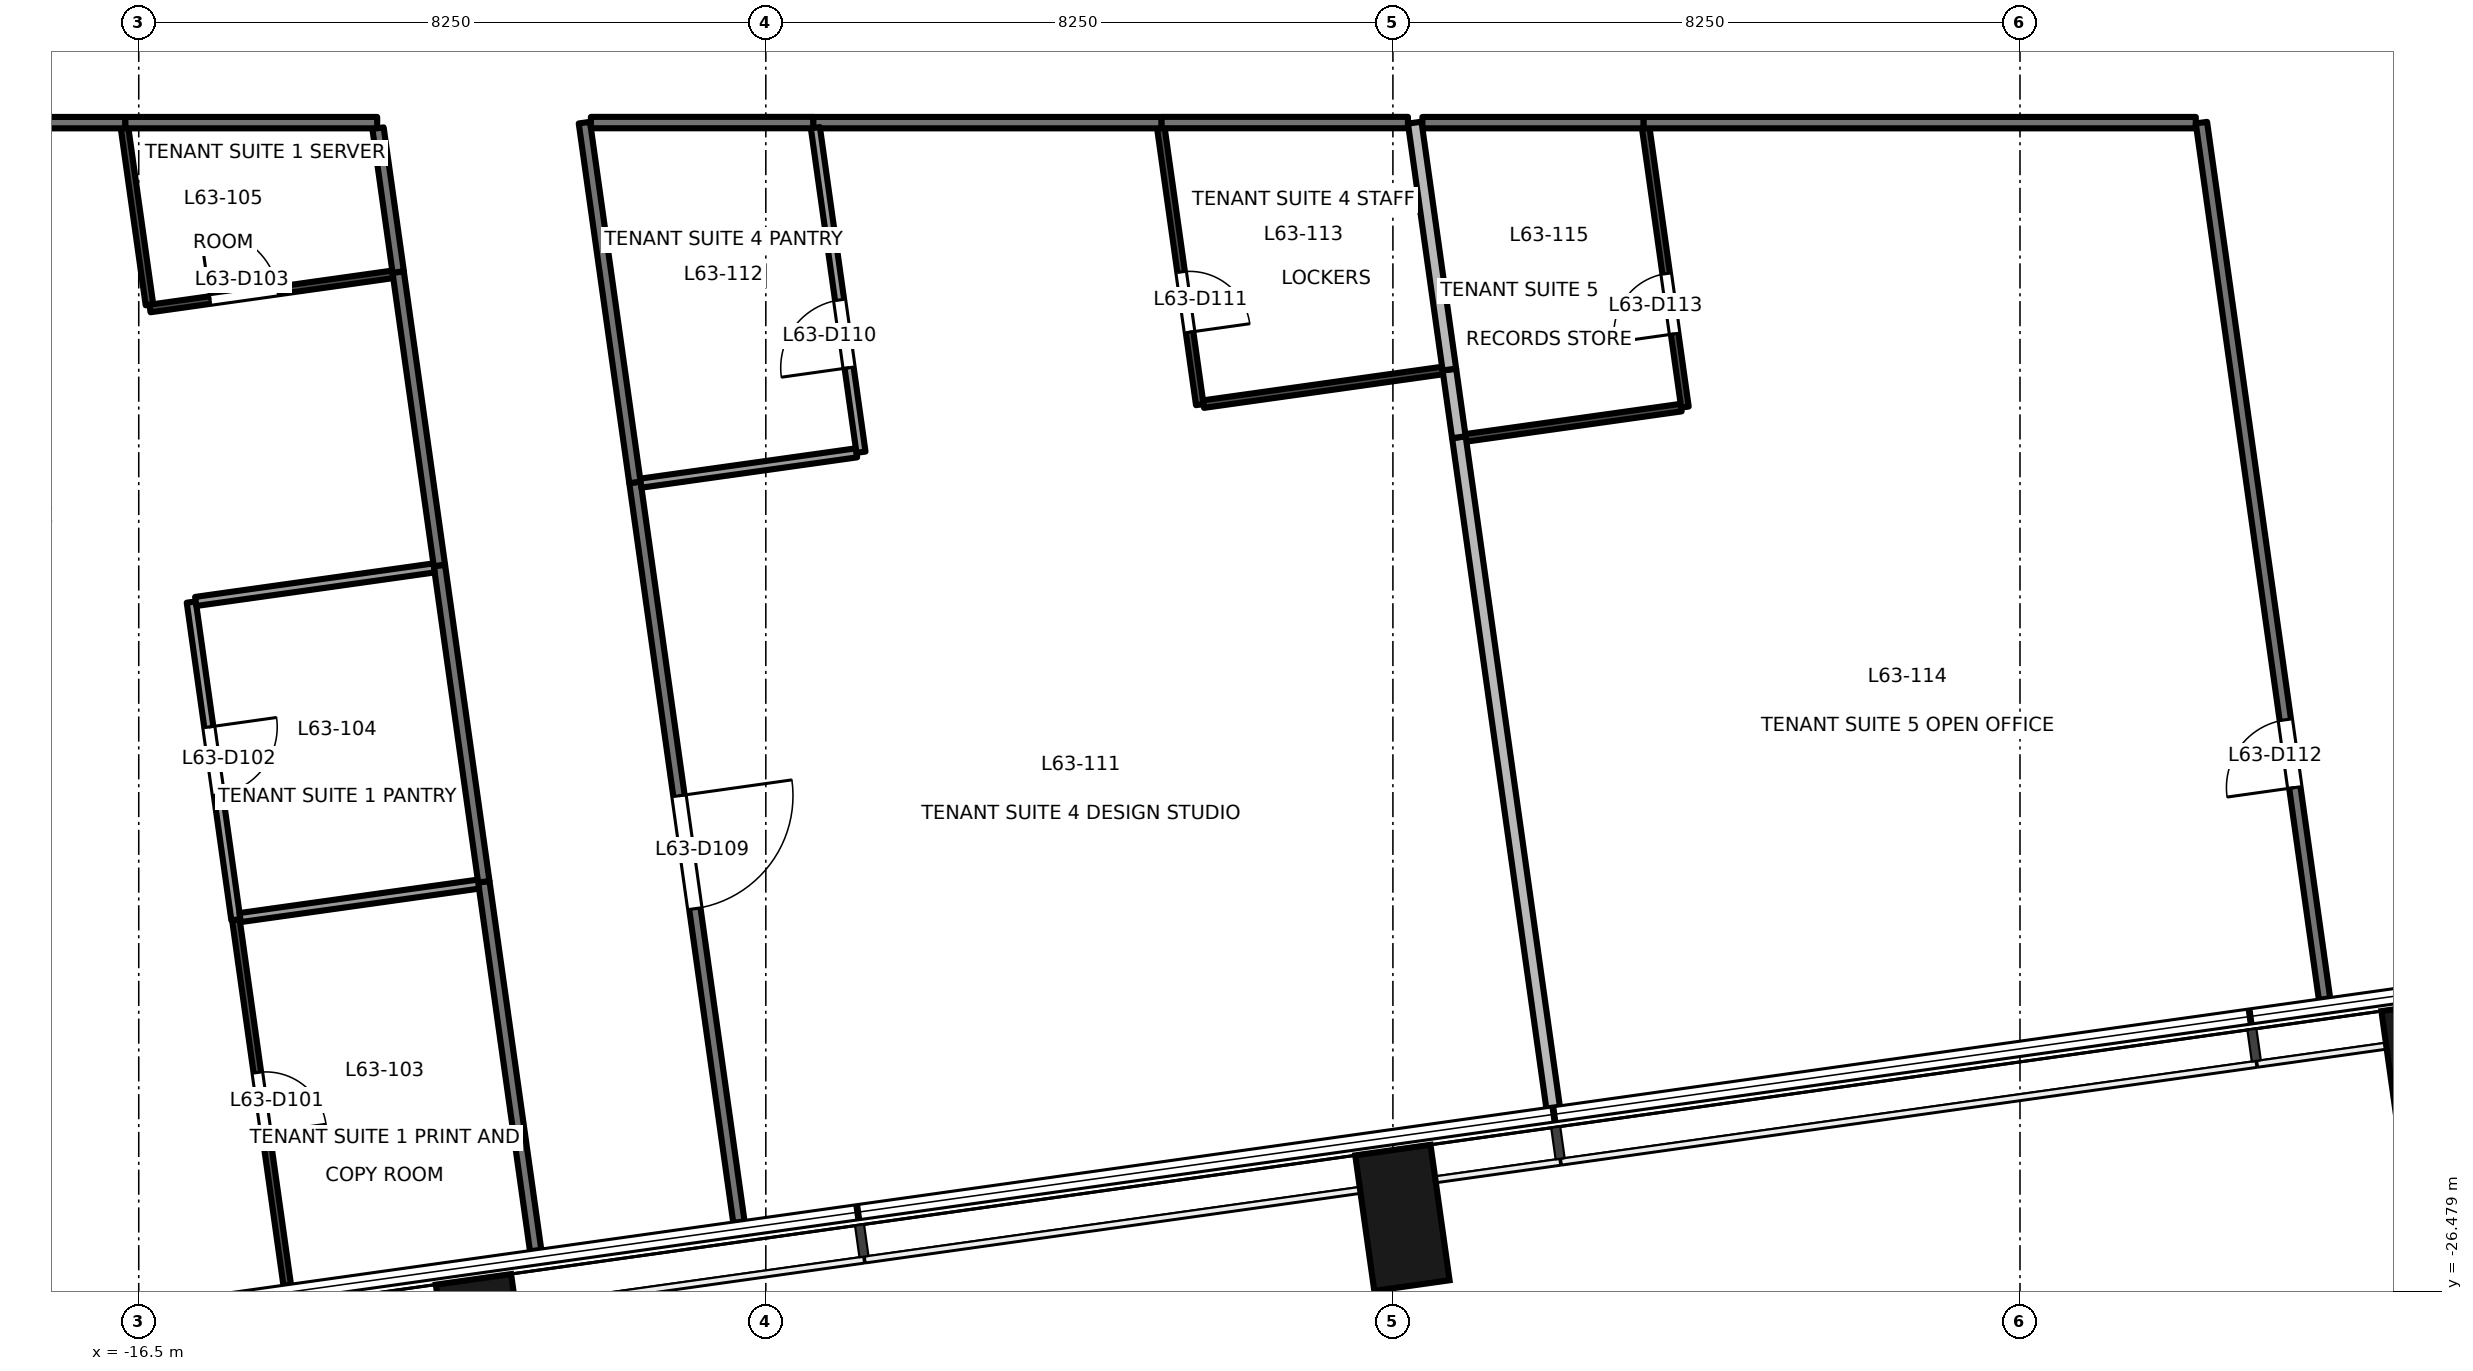
"""IFC4 building model, lengths in metres.
Left out: names, types, materials, properties, quantities, classifications, styles, units other than length and angle.
Written with IfcOpenShell. Run it as: python <this file> out.ifc"""

import sys

from ifc_helpers import new_model, si_unit, direction, frame, frame_2d, origin, origin_2d, place, context, subcontext, project, spatial, rectangle, extrude, element, fill, save


model = new_model("IFC4")
c1 = context("Model", 3, precision=1e-05, world=origin(), true_north=direction((0.0, 1.0)))
c2 = subcontext(c1, "Body", "Model", "MODEL_VIEW")
j1 = project(units=[si_unit("LENGTHUNIT", "METRE"), si_unit("PLANEANGLEUNIT", "RADIAN")], contexts=[c1])
p1 = place(None, origin())
s1 = spatial("IfcSite", under=j1, at=p1, CompositionType="ELEMENT")
p2 = place(p1, origin())
s2 = spatial("IfcBuilding", under=s1, at=p2, CompositionType="ELEMENT")
p3 = place(p2, frame((0.0, 0.0, 274.6)))
s3 = spatial("IfcBuildingStorey", under=s2, at=p3, CompositionType="ELEMENT", Elevation=274.6)
for number, where, z_axis, x_axis in (
    (1, (-11.971, -27.209, -0.2), (0.0, 0.0, 1.0), (0.99, 0.139, 0.0)),
    (2, (0.125, -25.508, -0.2), (0.0, 0.0, 1.0), (0.99, 0.139, 0.0)),
    (3, (13.625, -23.61, -0.2), (0.0, 0.0, 1.0), (0.99, 0.139, 0.0)),
):
    element("IfcColumn", number, at=place(p3, frame(where, z_axis=z_axis, x_axis=x_axis)), inside=s3, PredefinedType="COLUMN", context=c2, shape_type="SweptSolid", body=[
        extrude(rectangle(XDim=1.0, YDim=1.8, at=origin_2d()), origin(), (0.0, 0.0, 1.0), 3.9),
    ])
p4 = place(p3, frame((-16.676, -11.1, 0.0), z_axis=(0.0, 0.0, 1.0), x_axis=(-1.0, 0.0, 0.0)))
e4 = element("IfcWall", 4, at=p4, inside=s3, PredefinedType="PARTITIONING", context=c2, shape_type="SweptSolid", body=[
    extrude(rectangle(XDim=4.024, YDim=0.15, at=frame_2d((2.012, 0.0))), origin(), (0.0, 0.0, 1.0), 3.7),
])
p5 = place(p4, frame((1.562, 0.0, 0.0)))
e5 = element("IfcOpeningElement", 5, at=p5, cuts=e4, PredefinedType="OPENING", context=c2, shape_type="SweptSolid", body=[
    extrude(rectangle(XDim=0.9, YDim=2.1, at=frame_2d((0.45, 1.05))), frame((0.0, 0.085, 0.0), z_axis=(0.0, -1.0, 0.0), x_axis=(1.0, 0.0, 0.0)), (0.0, 0.0, 1.0), 0.171),
])
p6 = place(p3, frame((-12.544, -16.928, 0.0), z_axis=(0.0, 0.0, 1.0), x_axis=(-0.139221261089, 0.990261299083, 0.0)))
e6 = element("IfcWall", 6, at=p6, inside=s3, PredefinedType="PARTITIONING", context=c2, shape_type="SweptSolid", body=[
    extrude(rectangle(XDim=3.9, YDim=0.15, at=frame_2d((1.95, 0.0))), origin(), (0.0, 0.0, 1.0), 3.7),
])
p7 = place(p3, frame((-11.278, -25.939, 0.0), z_axis=(0.0, 0.0, 1.0), x_axis=(-0.139167797017, 0.990268814148, 0.0)))
e7 = element("IfcWall", 7, at=p7, inside=s3, PredefinedType="PARTITIONING", context=c2, shape_type="SweptSolid", body=[
    extrude(rectangle(XDim=4.9, YDim=0.15, at=frame_2d((2.45, 0.0))), origin(), (0.0, 0.0, 1.0), 3.7),
])
p8 = place(p3, frame((-11.96, -21.087, 0.0), z_axis=(0.0, 0.0, 1.0), x_axis=(-0.139052638616, 0.990284991148, 0.0)))
e8 = element("IfcWall", 8, at=p8, inside=s3, PredefinedType="PARTITIONING", context=c2, shape_type="SweptSolid", body=[
    extrude(rectangle(XDim=4.2, YDim=0.15, at=frame_2d((2.1, 0.0))), origin(), (0.0, 0.0, 1.0), 3.7),
])
p9 = place(p3, frame((-13.363, -11.1, 0.0), z_axis=(0.0, 0.0, 1.0), x_axis=(-1.0, 0.0, 0.0)))
e9 = element("IfcWall", 9, at=p9, inside=s3, PredefinedType="PARTITIONING", context=c2, shape_type="SweptSolid", body=[
    extrude(rectangle(XDim=3.313, YDim=0.15, at=frame_2d((1.656, 0.0))), origin(), (0.0, 0.0, 1.0), 2.8),
])
p10 = place(p3, frame((-13.086, -13.065, 0.0), z_axis=(0.0, 0.0, 1.0), x_axis=(-0.139292033523, 0.990251346577, 0.0)))
e10 = element("IfcWall", 10, at=p10, inside=s3, PredefinedType="PARTITIONING", context=c2, shape_type="SweptSolid", body=[
    extrude(rectangle(XDim=1.91, YDim=0.15, at=frame_2d((0.955, 0.0))), origin(), (0.0, 0.0, 1.0), 2.8),
])
p11 = place(p3, frame((-9.972, -15.833, 0.0), z_axis=(0.0, 0.0, 1.0), x_axis=(0.139205343882, -0.990263536759, 0.0)))
e11 = element("IfcWall", 11, at=p11, inside=s3, PredefinedType="PARTITIONING", context=c2, shape_type="SweptSolid", body=[
    extrude(rectangle(XDim=9.827, YDim=0.15, at=frame_2d((4.913, 0.0))), origin(), (0.0, 0.0, 1.0), 2.8),
])
p12 = place(p11, frame((4.163, 0.0, 0.0)))
e12 = element("IfcOpeningElement", 12, at=p12, cuts=e11, PredefinedType="OPENING", context=c2, shape_type="SweptSolid", body=[
    extrude(rectangle(XDim=1.5, YDim=2.1, at=frame_2d((0.75, 1.05))), frame((0.0, 0.085, 0.0), z_axis=(0.0, -1.0, 0.0), x_axis=(1.0, 0.0, 0.0)), (0.0, 0.0, 1.0), 0.171),
])
p13 = place(p3, frame((-3.043, -11.1, 0.0), z_axis=(0.0, 0.0, 1.0), x_axis=(-1.0, 0.0, 0.0)))
e13 = element("IfcWall", 13, at=p13, inside=s3, PredefinedType="PARTITIONING", context=c2, shape_type="SweptSolid", body=[
    extrude(rectangle(XDim=4.584, YDim=0.15, at=frame_2d((2.292, 0.0))), origin(), (0.0, 0.0, 1.0), 2.8),
])
p14 = place(p3, frame((-10.637, -11.1, 0.0), z_axis=(0.0, 0.0, 1.0), x_axis=(0.139146821365, -0.990271761742, 0.0)))
e14 = element("IfcWall", 14, at=p14, inside=s3, PredefinedType="PARTITIONING", context=c2, shape_type="SweptSolid", body=[
    extrude(rectangle(XDim=4.779, YDim=0.15, at=frame_2d((2.39, 0.0))), origin(), (0.0, 0.0, 1.0), 3.7),
])
p15 = place(p3, frame((-7.627, -11.099, 0.0), z_axis=(0.0, 0.0, 1.0), x_axis=(-1.0, 0.0, 0.0)))
e15 = element("IfcWall", 15, at=p15, inside=s3, PredefinedType="PARTITIONING", context=c2, shape_type="SweptSolid", body=[
    extrude(rectangle(XDim=2.924, YDim=0.15, at=frame_2d((1.462, 0.0))), origin(), (0.0, 0.0, 1.0), 2.8),
])
p16 = place(p3, frame((0.198, -11.099, 0.0), z_axis=(0.0, 0.0, 1.0), x_axis=(-1.0, 0.0, 0.0)))
e16 = element("IfcWall", 16, at=p16, inside=s3, PredefinedType="PARTITIONING", context=c2, shape_type="SweptSolid", body=[
    extrude(rectangle(XDim=3.241, YDim=0.15, at=frame_2d((1.621, 0.0))), origin(), (0.0, 0.0, 1.0), 2.9),
])
p17 = place(p3, frame((10.563, -11.1, 0.0), z_axis=(0.0, 0.0, 1.0), x_axis=(-1.0, 0.0, 0.0)))
e17 = element("IfcWall", 17, at=p17, inside=s3, PredefinedType="PARTITIONING", context=c2, shape_type="SweptSolid", body=[
    extrude(rectangle(XDim=7.267, YDim=0.15, at=frame_2d((3.634, 0.0))), origin(), (0.0, 0.0, 1.0), 2.9),
])
p18 = place(p3, frame((12.257, -22.631, 0.0), z_axis=(0.0, 0.0, 1.0), x_axis=(-0.139134361512, 0.990273512443, 0.0)))
e18 = element("IfcWall", 18, at=p18, inside=s3, PredefinedType="PARTITIONING", context=c2, shape_type="SweptSolid", body=[
    extrude(rectangle(XDim=11.644, YDim=0.15, at=frame_2d((5.822, 0.0))), origin(), (0.0, 0.0, 1.0), 3.7),
])
p19 = place(p18, frame((2.811, 0.0, 0.0)))
e19 = element("IfcOpeningElement", 19, at=p19, cuts=e18, PredefinedType="OPENING", context=c2, shape_type="SweptSolid", body=[
    extrude(rectangle(XDim=0.9, YDim=2.1, at=frame_2d((0.45, 1.05))), frame((0.0, 0.085, 0.0), z_axis=(0.0, -1.0, 0.0), x_axis=(1.0, 0.0, 0.0)), (0.0, 0.0, 1.0), 0.171),
])
p20 = place(p3, frame((3.296, -11.1, 0.0), z_axis=(0.0, 0.0, 1.0), x_axis=(-1.0, 0.0, 0.0)))
e20 = element("IfcWall", 20, at=p20, inside=s3, PredefinedType="PARTITIONING", context=c2, shape_type="SweptSolid", body=[
    extrude(rectangle(XDim=2.908, YDim=0.15, at=frame_2d((1.454, 0.0))), origin(), (0.0, 0.0, 1.0), 3.7),
])
p21 = place(p3, frame((-15.222, -21.586, 0.0), z_axis=(0.0, 0.0, 1.0), x_axis=(0.139120882778, -0.990275406124, 0.0)))
e21 = element("IfcWall", 21, at=p21, inside=s3, PredefinedType="PARTITIONING", context=c2, shape_type="SweptSolid", body=[
    extrude(rectangle(XDim=4.859, YDim=0.1, at=frame_2d((2.43, 0.0))), origin(), (0.0, 0.0, 1.0), 3.7),
])
p22 = place(p21, frame((2.03, 0.0, 0.0)))
e22 = element("IfcOpeningElement", 22, at=p22, cuts=e21, PredefinedType="OPENING", context=c2, shape_type="SweptSolid", body=[
    extrude(rectangle(XDim=0.8, YDim=2.1, at=frame_2d((0.4, 1.05))), frame((0.0, 0.061, 0.0), z_axis=(0.0, -1.0, 0.0), x_axis=(1.0, 0.0, 0.0)), (0.0, 0.0, 1.0), 0.121),
])
p23 = place(p3, frame((-15.809, -17.407, 0.0), z_axis=(0.0, 0.0, 1.0), x_axis=(0.139136935655, -0.99027315077, 0.0)))
e23 = element("IfcWall", 23, at=p23, inside=s3, PredefinedType="PARTITIONING", context=c2, shape_type="SweptSolid", body=[
    extrude(rectangle(XDim=4.22, YDim=0.12, at=frame_2d((2.11, 0.0))), origin(), (0.0, 0.0, 1.0), 3.7),
])
p24 = place(p23, frame((1.66, 0.0, 0.0)))
e24 = element("IfcOpeningElement", 24, at=p24, cuts=e23, PredefinedType="OPENING", context=c2, shape_type="SweptSolid", body=[
    extrude(rectangle(XDim=0.9, YDim=2.1, at=frame_2d((0.45, 1.05))), frame((0.0, 0.071, 0.0), z_axis=(0.0, -1.0, 0.0), x_axis=(1.0, 0.0, 0.0)), (0.0, 0.0, 1.0), 0.141),
])
p25 = place(p3, frame((-12.615, -16.958, 0.0), z_axis=(0.0, 0.0, 1.0), x_axis=(-0.990254086283, -0.139272555084, 0.0)))
e25 = element("IfcWall", 25, at=p25, inside=s3, PredefinedType="PARTITIONING", context=c2, shape_type="SweptSolid", body=[
    extrude(rectangle(XDim=3.166, YDim=0.12, at=frame_2d((1.583, 0.0))), origin(), (0.0, 0.0, 1.0), 2.8),
])
p26 = place(p3, frame((-16.687, -11.168, 0.0), z_axis=(0.0, 0.0, 1.0), x_axis=(0.139560302367, -0.990213573934, 0.0)))
e26 = element("IfcWall", 26, at=p26, inside=s3, PredefinedType="PARTITIONING", context=c2, shape_type="SweptSolid", body=[
    extrude(rectangle(XDim=2.351, YDim=0.1, at=frame_2d((1.176, 0.0))), origin(), (0.0, 0.0, 1.0), 3.7),
])
p27 = place(p3, frame((-16.352, -13.545, 0.0), z_axis=(0.0, 0.0, 1.0), x_axis=(0.990264894561, 0.13919568456, 0.0)))
e27 = element("IfcWall", 27, at=p27, inside=s3, PredefinedType="PARTITIONING", context=c2, shape_type="SweptSolid", body=[
    extrude(rectangle(XDim=3.226, YDim=0.1, at=frame_2d((1.613, 0.0))), origin(), (0.0, 0.0, 1.0), 2.8),
])
p28 = place(p27, frame((0.798, 0.0, 0.0)))
e28 = element("IfcOpeningElement", 28, at=p28, cuts=e27, PredefinedType="OPENING", context=c2, shape_type="SweptSolid", body=[
    extrude(rectangle(XDim=0.9, YDim=2.1, at=frame_2d((0.45, 1.05))), frame((0.0, 0.061, 0.0), z_axis=(0.0, -1.0, 0.0), x_axis=(1.0, 0.0, 0.0)), (0.0, 0.0, 1.0), 0.121),
])
p29 = place(p3, frame((-15.166, -21.558, 0.0), z_axis=(0.0, 0.0, 1.0), x_axis=(0.990285967974, 0.139045681821, 0.0)))
e29 = element("IfcWall", 29, at=p29, inside=s3, PredefinedType="PARTITIONING", context=c2, shape_type="SweptSolid", body=[
    extrude(rectangle(XDim=3.166, YDim=0.12, at=frame_2d((1.583, 0.0))), origin(), (0.0, 0.0, 1.0), 2.8),
])
p30 = place(p3, frame((-9.895, -15.843, 0.0), z_axis=(0.0, 0.0, 1.0), x_axis=(0.990265570358, 0.139190876728, 0.0)))
e30 = element("IfcWall", 30, at=p30, inside=s3, PredefinedType="PARTITIONING", context=c2, shape_type="SweptSolid", body=[
    extrude(rectangle(XDim=2.866, YDim=0.12, at=frame_2d((1.433, 0.0))), origin(), (0.0, 0.0, 1.0), 2.8),
])
p31 = place(p3, frame((-6.998, -15.436, 0.0), z_axis=(0.0, 0.0, 1.0), x_axis=(-0.139145497857, 0.990271947712, 0.0)))
e31 = element("IfcWall", 31, at=p31, inside=s3, PredefinedType="PARTITIONING", context=c2, shape_type="SweptSolid", body=[
    extrude(rectangle(XDim=4.311, YDim=0.12, at=frame_2d((2.156, 0.0))), origin(), (0.0, 0.0, 1.0), 3.7),
])
p32 = place(p31, frame((1.123, 0.0, 0.0)))
e32 = element("IfcOpeningElement", 32, at=p32, cuts=e31, PredefinedType="OPENING", context=c2, shape_type="SweptSolid", body=[
    extrude(rectangle(XDim=0.9, YDim=2.1, at=frame_2d((0.45, 1.05))), frame((0.0, 0.071, 0.0), z_axis=(0.0, -1.0, 0.0), x_axis=(1.0, 0.0, 0.0)), (0.0, 0.0, 1.0), 0.141),
])
p33 = place(p3, frame((-3.053, -11.168, 0.0), z_axis=(0.0, 0.0, 1.0), x_axis=(0.139199908751, -0.990264300782, 0.0)))
e33 = element("IfcWall", 33, at=p33, inside=s3, PredefinedType="PARTITIONING", context=c2, shape_type="SweptSolid", body=[
    extrude(rectangle(XDim=3.678, YDim=0.1, at=frame_2d((1.839, 0.0))), origin(), (0.0, 0.0, 1.0), 3.7),
])
p34 = place(p33, frame((1.915, 0.0, 0.0)))
e34 = element("IfcOpeningElement", 34, at=p34, cuts=e33, PredefinedType="OPENING", context=c2, shape_type="SweptSolid", body=[
    extrude(rectangle(XDim=0.8, YDim=2.1, at=frame_2d((0.4, 1.05))), frame((0.0, 0.061, 0.0), z_axis=(0.0, -1.0, 0.0), x_axis=(1.0, 0.0, 0.0)), (0.0, 0.0, 1.0), 0.121),
])
p35 = place(p3, frame((-2.492, -14.803, 0.0), z_axis=(0.0, 0.0, 1.0), x_axis=(0.990278754473, 0.139097046841, 0.0)))
e35 = element("IfcWall", 35, at=p35, inside=s3, PredefinedType="PARTITIONING", context=c2, shape_type="SweptSolid", body=[
    extrude(rectangle(XDim=3.177, YDim=0.1, at=frame_2d((1.588, 0.0))), origin(), (0.0, 0.0, 1.0), 2.9),
])
p36 = place(p3, frame((0.868, -15.239, 0.0), z_axis=(0.0, 0.0, 1.0), x_axis=(0.139233409815, -0.990259591012, 0.0)))
e36 = element("IfcWall", 36, at=p36, inside=s3, PredefinedType="PARTITIONING", context=c2, shape_type="SweptSolid", body=[
    extrude(rectangle(XDim=8.906, YDim=0.18, at=frame_2d((4.453, 0.0))), origin(), (0.0, 0.0, 1.0), 3.7),
])
p37 = place(p3, frame((0.743, -14.349, 0.0), z_axis=(0.0, 0.0, 1.0), x_axis=(0.139100809785, -0.990278225913, 0.0)))
e37 = element("IfcWall", 37, at=p37, inside=s3, PredefinedType="PARTITIONING", context=c2, shape_type="SweptSolid", body=[
    extrude(rectangle(XDim=0.899, YDim=0.18, at=frame_2d((0.449, 0.0))), origin(), (0.0, 0.0, 1.0), 3.7),
])
p38 = place(p3, frame((0.287, -11.1, 0.0), z_axis=(0.0, 0.0, 1.0), x_axis=(0.13898222456, -0.990294875911, 0.0)))
e38 = element("IfcWall", 38, at=p38, inside=s3, PredefinedType="PARTITIONING", context=c2, shape_type="SweptSolid", body=[
    extrude(rectangle(XDim=3.28, YDim=0.18, at=frame_2d((1.64, 0.0))), origin(), (0.0, 0.0, 1.0), 3.7),
])
p39 = place(p3, frame((0.96, -15.247, 0.0), z_axis=(0.0, 0.0, 1.0), x_axis=(0.990271288443, 0.139150189669, 0.0)))
e39 = element("IfcWall", 39, at=p39, inside=s3, PredefinedType="PARTITIONING", context=c2, shape_type="SweptSolid", body=[
    extrude(rectangle(XDim=2.86, YDim=0.1, at=frame_2d((1.43, 0.0))), origin(), (0.0, 0.0, 1.0), 3.7),
])
p40 = place(p3, frame((3.842, -14.842, 0.0), z_axis=(0.0, 0.0, 1.0), x_axis=(-0.139108634852, 0.990277126722, 0.0)))
e40 = element("IfcWall", 40, at=p40, inside=s3, PredefinedType="PARTITIONING", context=c2, shape_type="SweptSolid", body=[
    extrude(rectangle(XDim=3.71, YDim=0.1, at=frame_2d((1.855, 0.0))), origin(), (0.0, 0.0, 1.0), 3.7),
])
p41 = place(p40, frame((0.973, 0.0, 0.0)))
e41 = element("IfcOpeningElement", 41, at=p41, cuts=e40, PredefinedType="OPENING", context=c2, shape_type="SweptSolid", body=[
    extrude(rectangle(XDim=0.8, YDim=2.1, at=frame_2d((0.4, 1.05))), frame((0.0, 0.061, 0.0), z_axis=(0.0, -1.0, 0.0), x_axis=(1.0, 0.0, 0.0)), (0.0, 0.0, 1.0), 0.121),
])
p42 = place(p22, origin())
e42 = element("IfcDoor", 42, at=p42, inside=s3, OperationType="SINGLE_SWING_RIGHT", PredefinedType="DOOR", context=c2, shape_type="SweptSolid", body=[
    extrude(rectangle(XDim=0.8, YDim=2.1, at=frame_2d((0.4, 1.05))), frame((0.0, 0.025, 0.0), z_axis=(0.0, -1.0, 0.0), x_axis=(1.0, 0.0, 0.0)), (0.0, 0.0, 1.0), 0.05),
])
fill(e22, e42)
p43 = place(p24, origin())
e43 = element("IfcDoor", 43, at=p43, inside=s3, OperationType="SINGLE_SWING_LEFT", PredefinedType="DOOR", context=c2, shape_type="SweptSolid", body=[
    extrude(rectangle(XDim=0.9, YDim=2.1, at=frame_2d((0.45, 1.05))), frame((0.0, 0.025, 0.0), z_axis=(0.0, -1.0, 0.0), x_axis=(1.0, 0.0, 0.0)), (0.0, 0.0, 1.0), 0.05),
])
fill(e24, e43)
p44 = place(p28, origin())
e44 = element("IfcDoor", 44, at=p44, inside=s3, OperationType="SINGLE_SWING_LEFT", PredefinedType="DOOR", context=c2, shape_type="SweptSolid", body=[
    extrude(rectangle(XDim=0.9, YDim=2.1, at=frame_2d((0.45, 1.05))), frame((0.0, 0.025, 0.0), z_axis=(0.0, -1.0, 0.0), x_axis=(1.0, 0.0, 0.0)), (0.0, 0.0, 1.0), 0.05),
])
fill(e28, e44)
p45 = place(p12, origin())
e45 = element("IfcDoor", 45, at=p45, inside=s3, OperationType="DOUBLE_DOOR_SINGLE_SWING", PredefinedType="DOOR", context=c2, shape_type="SweptSolid", body=[
    extrude(rectangle(XDim=1.5, YDim=2.1, at=frame_2d((0.75, 1.05))), frame((0.0, 0.025, 0.0), z_axis=(0.0, -1.0, 0.0), x_axis=(1.0, 0.0, 0.0)), (0.0, 0.0, 1.0), 0.05),
])
fill(e12, e45)
p46 = place(p32, origin())
e46 = element("IfcDoor", 46, at=p46, inside=s3, OperationType="SINGLE_SWING_LEFT", PredefinedType="DOOR", context=c2, shape_type="SweptSolid", body=[
    extrude(rectangle(XDim=0.9, YDim=2.1, at=frame_2d((0.45, 1.05))), frame((0.0, 0.025, 0.0), z_axis=(0.0, -1.0, 0.0), x_axis=(1.0, 0.0, 0.0)), (0.0, 0.0, 1.0), 0.05),
])
fill(e32, e46)
p47 = place(p34, origin())
e47 = element("IfcDoor", 47, at=p47, inside=s3, OperationType="SINGLE_SWING_RIGHT", PredefinedType="DOOR", context=c2, shape_type="SweptSolid", body=[
    extrude(rectangle(XDim=0.8, YDim=2.1, at=frame_2d((0.4, 1.05))), frame((0.0, 0.025, 0.0), z_axis=(0.0, -1.0, 0.0), x_axis=(1.0, 0.0, 0.0)), (0.0, 0.0, 1.0), 0.05),
])
fill(e34, e47)
p48 = place(p19, origin())
e48 = element("IfcDoor", 48, at=p48, inside=s3, OperationType="SINGLE_SWING_LEFT", PredefinedType="DOOR", context=c2, shape_type="SweptSolid", body=[
    extrude(rectangle(XDim=0.9, YDim=2.1, at=frame_2d((0.45, 1.05))), frame((0.0, 0.025, 0.0), z_axis=(0.0, -1.0, 0.0), x_axis=(1.0, 0.0, 0.0)), (0.0, 0.0, 1.0), 0.05),
])
fill(e19, e48)
p49 = place(p41, origin())
e49 = element("IfcDoor", 49, at=p49, inside=s3, OperationType="SINGLE_SWING_LEFT", PredefinedType="DOOR", context=c2, shape_type="SweptSolid", body=[
    extrude(rectangle(XDim=0.8, YDim=2.1, at=frame_2d((0.4, 1.05))), frame((0.0, 0.025, 0.0), z_axis=(0.0, -1.0, 0.0), x_axis=(1.0, 0.0, 0.0)), (0.0, 0.0, 1.0), 0.05),
])
fill(e41, e49)
save(model, sys.argv[1])
